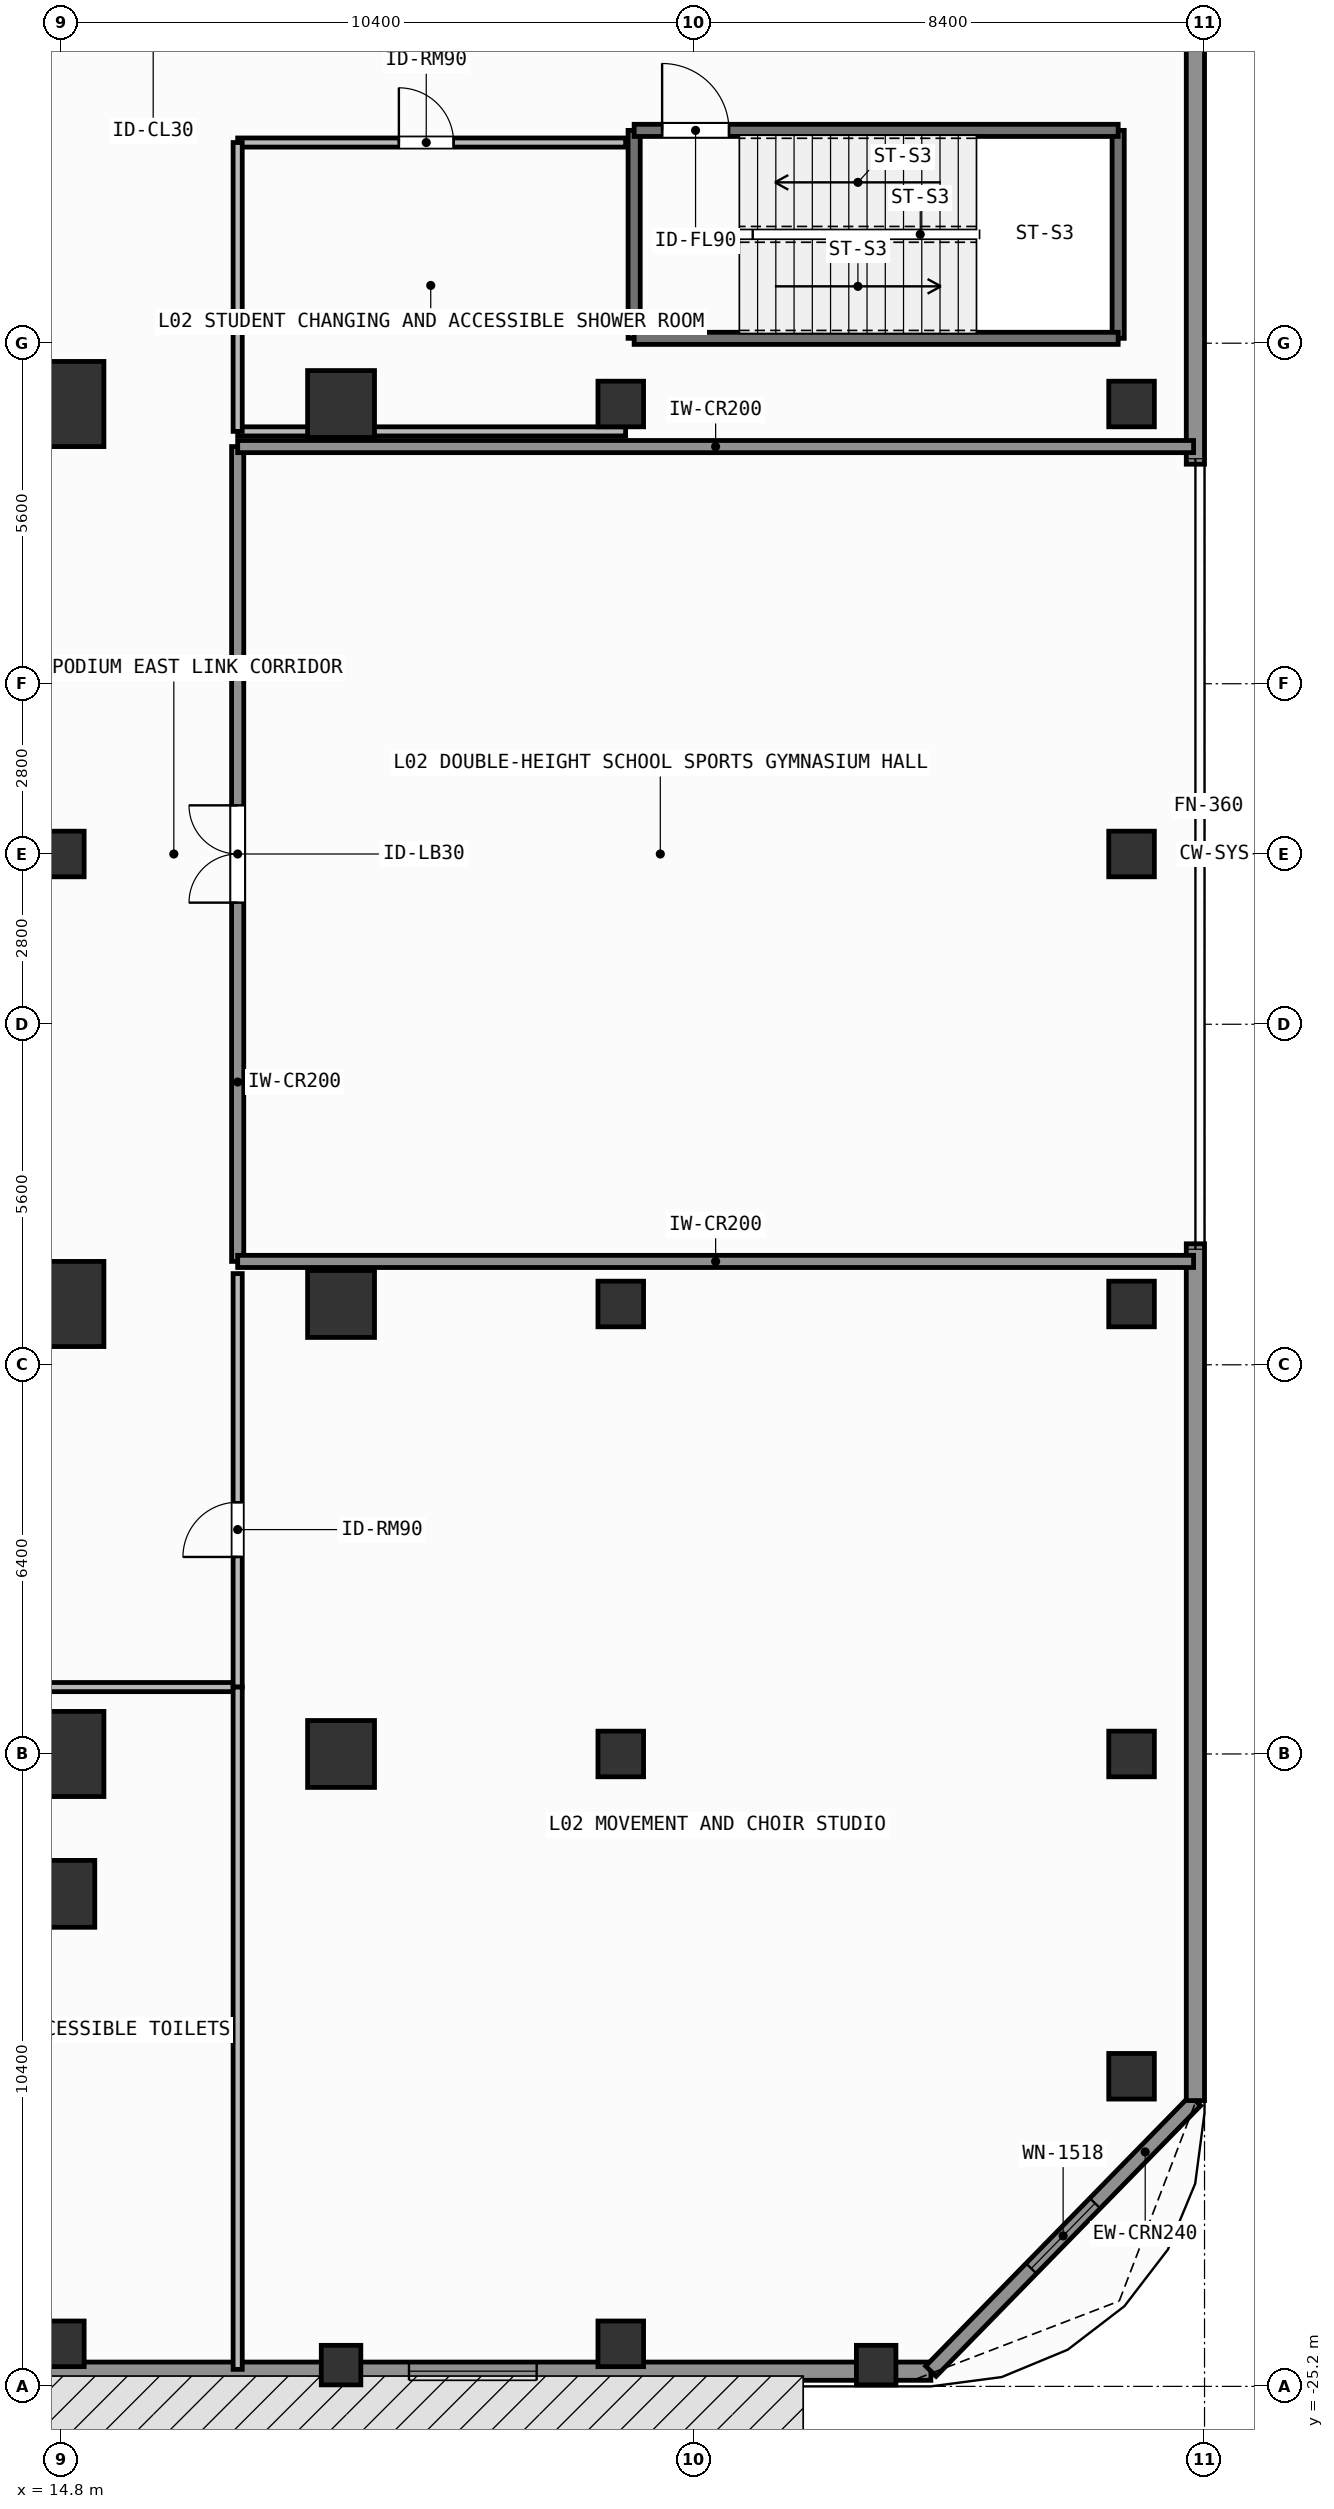
"""IFC4 building model, lengths in metres.
Left out: names, types, materials, properties, quantities, classifications, styles, units other than length and angle.
Written with IfcOpenShell. Run it as: python <this file> out.ifc"""

import sys

from ifc_helpers import new_model, si_unit, direction, frame, frame_2d, origin, origin_2d, place, context, subcontext, project, spatial, rectangle, extrude, element, fill, save


model = new_model("IFC4")
c1 = context("Model", 3, precision=1e-05, world=origin(), true_north=direction((0.0, 1.0)))
c2 = subcontext(c1, "Body", "Model", "MODEL_VIEW")
j1 = project(units=[si_unit("LENGTHUNIT", "METRE"), si_unit("PLANEANGLEUNIT", "RADIAN")], contexts=[c1])
p1 = place(None, origin())
s1 = spatial("IfcSite", under=j1, at=p1, CompositionType="ELEMENT")
p2 = place(p1, origin())
s2 = spatial("IfcBuilding", under=s1, at=p2, CompositionType="ELEMENT")
p3 = place(p2, frame((0.0, 0.0, 4.8)))
s3 = spatial("IfcBuildingStorey", under=s2, at=p3, CompositionType="ELEMENT", Elevation=4.8)
for number, where, z_axis, x_axis in (
    (1, (14.8, -14.8, 0.0), (0.0, 0.0, 1.0), (1.0, 0.0, 0.0)),
    (2, (14.8, -7.4, 0.0), (0.0, 0.0, 1.0), (1.0, 0.0, 0.0)),
    (3, (14.8, 7.4, 0.0), (0.0, 0.0, 1.0), (1.0, 0.0, 0.0)),
):
    element("IfcColumn", number, at=place(p3, frame(where, z_axis=z_axis, x_axis=x_axis)), inside=s3, PredefinedType="COLUMN", context=c2, shape_type="SweptSolid", body=[
        extrude(rectangle(XDim=1.4, YDim=1.4, at=origin_2d()), origin(), (0.0, 0.0, 1.0), 4.2),
    ])
for number, where, z_axis, x_axis in (
    (4, (19.4, -14.8, 0.0), (0.0, 0.0, 1.0), (1.0, 0.0, 0.0)),
    (5, (19.4, -7.4, 0.0), (0.0, 0.0, 1.0), (1.0, 0.0, 0.0)),
    (6, (19.4, 7.4, 0.0), (0.0, 0.0, 1.0), (1.0, 0.0, 0.0)),
    (7, (14.8, -17.1, 0.0), (0.0, 0.0, 1.0), (1.0, 0.0, 0.0)),
):
    element("IfcColumn", number, at=place(p3, frame(where, z_axis=z_axis, x_axis=x_axis)), inside=s3, PredefinedType="COLUMN", context=c2, shape_type="SweptSolid", body=[
        extrude(rectangle(XDim=1.1, YDim=1.1, at=origin_2d()), origin(), (0.0, 0.0, 1.0), 4.2),
    ])
for number, where, z_axis, x_axis in (
    (8, (14.8, -24.5, 0.0), (0.0, 0.0, 1.0), (1.0, 0.0, 0.0)),
    (9, (14.8, 0.0, 0.0), (0.0, 0.0, 1.0), (1.0, 0.0, 0.0)),
    (10, (24.0, -24.5, 0.0), (0.0, 0.0, 1.0), (1.0, 0.0, 0.0)),
    (11, (24.0, -14.8, 0.0), (0.0, 0.0, 1.0), (1.0, 0.0, 0.0)),
    (12, (24.0, -7.4, 0.0), (0.0, 0.0, 1.0), (1.0, 0.0, 0.0)),
    (13, (24.0, 7.4, 0.0), (0.0, 0.0, 1.0), (1.0, 0.0, 0.0)),
    (14, (32.4, -14.8, 0.0), (0.0, 0.0, 1.0), (1.0, 0.0, 0.0)),
    (15, (32.4, -7.4, 0.0), (0.0, 0.0, 1.0), (1.0, 0.0, 0.0)),
    (16, (32.4, 0.0, 0.0), (0.0, 0.0, 1.0), (1.0, 0.0, 0.0)),
    (17, (32.4, 7.4, 0.0), (0.0, 0.0, 1.0), (1.0, 0.0, 0.0)),
    (18, (32.4, -20.1, 0.0), (0.0, 0.0, 1.0), (1.0, 0.0, 0.0)),
):
    element("IfcColumn", number, at=place(p3, frame(where, z_axis=z_axis, x_axis=x_axis)), inside=s3, PredefinedType="COLUMN", context=c2, shape_type="SweptSolid", body=[
        extrude(rectangle(XDim=0.75, YDim=0.75, at=origin_2d()), origin(), (0.0, 0.0, 1.0), 4.2),
    ])
for number, where, z_axis, x_axis in (
    (19, (19.4, -24.85, 0.0), (0.0, 0.0, 1.0), (1.0, 0.0, 0.0)),
    (20, (28.2, -24.85, 0.0), (0.0, 0.0, 1.0), (1.0, 0.0, 0.0)),
):
    element("IfcColumn", number, at=place(p3, frame(where, z_axis=z_axis, x_axis=x_axis)), inside=s3, PredefinedType="PILASTER", context=c2, shape_type="SweptSolid", body=[
        extrude(rectangle(XDim=0.65, YDim=0.65, at=origin_2d()), origin(), (0.0, 0.0, 1.0), 4.2),
    ])
p4 = place(p3, frame((29.1, -24.95, 0.0), z_axis=(0.0, 0.0, 1.0), x_axis=(-1.0, 0.0, 0.0)))
e21 = element("IfcWall", 21, at=p4, inside=s3, PredefinedType="SOLIDWALL", context=c2, shape_type="SweptSolid", body=[
    extrude(rectangle(XDim=58.2, YDim=0.3, at=frame_2d((29.1, 0.0))), origin(), (0.0, 0.0, 1.0), 3.96),
])
p5 = place(p4, frame((39.15, 0.0, 0.85)))
e22 = element("IfcOpeningElement", 22, at=p5, cuts=e21, PredefinedType="OPENING", context=c2, shape_type="SweptSolid", body=[
    extrude(rectangle(XDim=2.1, YDim=2.2, at=frame_2d((1.05, 1.1))), frame((0.0, 0.16, 0.0), z_axis=(0.0, -1.0, 0.0), x_axis=(1.0, 0.0, 0.0)), (0.0, 0.0, 1.0), 0.32),
])
p6 = place(p4, frame((30.875, 0.0, 0.85)))
e23 = element("IfcOpeningElement", 23, at=p6, cuts=e21, PredefinedType="OPENING", context=c2, shape_type="SweptSolid", body=[
    extrude(rectangle(XDim=2.1, YDim=2.2, at=frame_2d((1.05, 1.1))), frame((0.0, 0.16, 0.0), z_axis=(0.0, -1.0, 0.0), x_axis=(1.0, 0.0, 0.0)), (0.0, 0.0, 1.0), 0.32),
])
p7 = place(p4, frame((24.35, 0.0, 0.85)))
e24 = element("IfcOpeningElement", 24, at=p7, cuts=e21, PredefinedType="OPENING", context=c2, shape_type="SweptSolid", body=[
    extrude(rectangle(XDim=2.1, YDim=2.2, at=frame_2d((1.05, 1.1))), frame((0.0, 0.16, 0.0), z_axis=(0.0, -1.0, 0.0), x_axis=(1.0, 0.0, 0.0)), (0.0, 0.0, 1.0), 0.32),
])
p8 = place(p4, frame((18.325, 0.0, 0.85)))
e25 = element("IfcOpeningElement", 25, at=p8, cuts=e21, PredefinedType="OPENING", context=c2, shape_type="SweptSolid", body=[
    extrude(rectangle(XDim=2.1, YDim=2.2, at=frame_2d((1.05, 1.1))), frame((0.0, 0.16, 0.0), z_axis=(0.0, -1.0, 0.0), x_axis=(1.0, 0.0, 0.0)), (0.0, 0.0, 1.0), 0.32),
])
p9 = place(p4, frame((6.483, 0.0, 0.85)))
e26 = element("IfcOpeningElement", 26, at=p9, cuts=e21, PredefinedType="OPENING", context=c2, shape_type="SweptSolid", body=[
    extrude(rectangle(XDim=2.1, YDim=2.2, at=frame_2d((1.05, 1.1))), frame((0.0, 0.16, 0.0), z_axis=(0.0, -1.0, 0.0), x_axis=(1.0, 0.0, 0.0)), (0.0, 0.0, 1.0), 0.32),
])
p10 = place(p3, frame((33.45, -20.5, 0.0), z_axis=(0.0, 0.0, 1.0), x_axis=(-0.69901822973, -0.715103848756, 0.0)))
e27 = element("IfcWall", 27, at=p10, inside=s3, PredefinedType="SOLIDWALL", context=c2, shape_type="SweptSolid", body=[
    extrude(rectangle(XDim=6.223, YDim=0.24, at=frame_2d((3.111, 0.0))), origin(), (0.0, 0.0, 1.0), 3.96),
])
p11 = place(p10, frame((2.362, 0.0, 0.85)))
e28 = element("IfcOpeningElement", 28, at=p11, cuts=e27, PredefinedType="OPENING", context=c2, shape_type="SweptSolid", body=[
    extrude(rectangle(XDim=1.5, YDim=1.85, at=frame_2d((0.75, 0.925))), frame((0.0, 0.13, 0.0), z_axis=(0.0, -1.0, 0.0), x_axis=(1.0, 0.0, 0.0)), (0.0, 0.0, 1.0), 0.26),
])
for number, where, z_axis, x_axis in (
    (29, (33.45, -20.5, 0.0), (0.0, 0.0, 1.0), (0.0, 1.0, 0.0)),
    (30, (33.45, 6.41, 0.0), (0.0, 0.0, 1.0), (0.0, 1.0, 0.0)),
):
    element("IfcWall", number, at=place(p3, frame(where, z_axis=z_axis, x_axis=x_axis)), inside=s3, PredefinedType="SOLIDWALL", context=c2, shape_type="SweptSolid", body=[
        extrude(rectangle(XDim=14.09, YDim=0.3, at=frame_2d((7.045, 0.0))), origin(), (0.0, 0.0, 1.0), 3.96),
    ])
for number, where, z_axis, x_axis in (
    (31, (24.22, 8.48, 0.0), (0.0, 0.0, 1.0), (0.0, 1.0, 0.0)),
    (32, (32.18, 11.9, 0.0), (0.0, 0.0, 1.0), (0.0, -1.0, 0.0)),
):
    element("IfcWall", number, at=place(p3, frame(where, z_axis=z_axis, x_axis=x_axis)), inside=s3, PredefinedType="SHEAR", context=c2, shape_type="SweptSolid", body=[
        extrude(rectangle(XDim=3.42, YDim=0.2, at=frame_2d((1.71, 0.0))), origin(), (0.0, 0.0, 1.0), 3.96),
    ])
p12 = place(p3, frame((32.18, 8.48, 0.0), z_axis=(0.0, 0.0, 1.0), x_axis=(-1.0, 0.0, 0.0)))
e33 = element("IfcWall", 33, at=p12, inside=s3, PredefinedType="SHEAR", context=c2, shape_type="SweptSolid", body=[
    extrude(rectangle(XDim=7.96, YDim=0.2, at=frame_2d((3.98, 0.0))), origin(), (0.0, 0.0, 1.0), 3.96),
])
p13 = place(p3, frame((24.22, 11.9, 0.0), z_axis=(0.0, 0.0, 1.0), x_axis=(1.0, 0.0, 0.0)))
e34 = element("IfcWall", 34, at=p13, inside=s3, PredefinedType="SHEAR", context=c2, shape_type="SweptSolid", body=[
    extrude(rectangle(XDim=7.96, YDim=0.2, at=frame_2d((3.98, 0.0))), origin(), (0.0, 0.0, 1.0), 3.96),
])
p14 = place(p13, frame((0.46, 0.0, 0.0)))
e35 = element("IfcOpeningElement", 35, at=p14, cuts=e34, PredefinedType="OPENING", context=c2, shape_type="SweptSolid", body=[
    extrude(rectangle(XDim=1.1, YDim=2.15, at=frame_2d((0.55, 1.075))), frame((0.0, 0.11, 0.0), z_axis=(0.0, -1.0, 0.0), x_axis=(1.0, 0.0, 0.0)), (0.0, 0.0, 1.0), 0.22),
])
p15 = place(p3, frame((17.7, -6.7, 0.0), z_axis=(0.0, 0.0, 1.0), x_axis=(0.0, 1.0, 0.0)))
e36 = element("IfcWall", 36, at=p15, inside=s3, PredefinedType="SOLIDWALL", context=c2, shape_type="SweptSolid", body=[
    extrude(rectangle(XDim=13.4, YDim=0.2, at=frame_2d((6.7, 0.0))), origin(), (0.0, 0.0, 1.0), 3.96),
])
p16 = place(p15, frame((5.9, 0.0, 0.0)))
e37 = element("IfcOpeningElement", 37, at=p16, cuts=e36, PredefinedType="OPENING", context=c2, shape_type="SweptSolid", body=[
    extrude(rectangle(XDim=1.6, YDim=2.3, at=frame_2d((0.8, 1.15))), frame((0.0, 0.11, 0.0), z_axis=(0.0, -1.0, 0.0), x_axis=(1.0, 0.0, 0.0)), (0.0, 0.0, 1.0), 0.22),
])
p17 = place(p3, frame((17.7, 11.7, 0.0), z_axis=(0.0, 0.0, 1.0), x_axis=(1.0, 0.0, 0.0)))
e38 = element("IfcWall", 38, at=p17, inside=s3, PredefinedType="PARTITIONING", context=c2, shape_type="SweptSolid", body=[
    extrude(rectangle(XDim=6.38, YDim=0.15, at=frame_2d((3.19, 0.0))), origin(), (0.0, 0.0, 1.0), 3.96),
])
p18 = place(p17, frame((2.651, 0.0, 0.0)))
e39 = element("IfcOpeningElement", 39, at=p18, cuts=e38, PredefinedType="OPENING", context=c2, shape_type="SweptSolid", body=[
    extrude(rectangle(XDim=0.9, YDim=2.1, at=frame_2d((0.45, 1.05))), frame((0.0, 0.085, 0.0), z_axis=(0.0, -1.0, 0.0), x_axis=(1.0, 0.0, 0.0)), (0.0, 0.0, 1.0), 0.17),
])
p19 = place(p3, frame((11.6, -13.7, 0.0), z_axis=(0.0, 0.0, 1.0), x_axis=(1.0, 0.0, 0.0)))
e40 = element("IfcWall", 40, at=p19, inside=s3, PredefinedType="PARTITIONING", context=c2, shape_type="SweptSolid", body=[
    extrude(rectangle(XDim=6.05, YDim=0.15, at=frame_2d((3.025, 0.0))), origin(), (0.0, 0.0, 1.0), 3.96),
])
p20 = place(p19, frame((1.412, 0.0, 0.0)))
e41 = element("IfcOpeningElement", 41, at=p20, cuts=e40, PredefinedType="OPENING", context=c2, shape_type="SweptSolid", body=[
    extrude(rectangle(XDim=0.9, YDim=2.1, at=frame_2d((0.45, 1.05))), frame((0.0, 0.085, 0.0), z_axis=(0.0, -1.0, 0.0), x_axis=(1.0, 0.0, 0.0)), (0.0, 0.0, 1.0), 0.17),
])
p21 = place(p3, frame((17.7, -13.7, 0.0), z_axis=(0.0, 0.0, 1.0), x_axis=(0.0, 1.0, 0.0)))
e42 = element("IfcWall", 42, at=p21, inside=s3, PredefinedType="PARTITIONING", context=c2, shape_type="SweptSolid", body=[
    extrude(rectangle(XDim=6.8, YDim=0.15, at=frame_2d((3.4, 0.0))), origin(), (0.0, 0.0, 1.0), 3.96),
])
p22 = place(p21, frame((2.14, 0.0, 0.0)))
e43 = element("IfcOpeningElement", 43, at=p22, cuts=e42, PredefinedType="OPENING", context=c2, shape_type="SweptSolid", body=[
    extrude(rectangle(XDim=0.9, YDim=2.1, at=frame_2d((0.45, 1.05))), frame((0.0, 0.085, 0.0), z_axis=(0.0, -1.0, 0.0), x_axis=(1.0, 0.0, 0.0)), (0.0, 0.0, 1.0), 0.17),
])
for number, where, z_axis, x_axis in (
    (44, (17.7, -6.7, 0.0), (0.0, 0.0, 1.0), (1.0, 0.0, 0.0)),
    (45, (17.7, 6.7, 0.0), (0.0, 0.0, 1.0), (1.0, 0.0, 0.0)),
):
    element("IfcWall", number, at=place(p3, frame(where, z_axis=z_axis, x_axis=x_axis)), inside=s3, PredefinedType="SOLIDWALL", context=c2, shape_type="SweptSolid", body=[
        extrude(rectangle(XDim=15.72, YDim=0.2, at=frame_2d((7.86, 0.0))), origin(), (0.0, 0.0, 1.0), 3.96),
    ])
p23 = place(p3, frame((17.7, 6.95, 0.0), z_axis=(0.0, 0.0, 1.0), x_axis=(1.0, 0.0, 0.0)))
e46 = element("IfcWall", 46, at=p23, inside=s3, PredefinedType="PARTITIONING", context=c2, shape_type="SweptSolid", body=[
    extrude(rectangle(XDim=6.38, YDim=0.15, at=frame_2d((3.19, 0.0))), origin(), (0.0, 0.0, 1.0), 3.96),
])
p24 = place(p3, frame((17.7, 6.95, 0.0), z_axis=(0.0, 0.0, 1.0), x_axis=(0.0, 1.0, 0.0)))
e47 = element("IfcWall", 47, at=p24, inside=s3, PredefinedType="PARTITIONING", context=c2, shape_type="SweptSolid", body=[
    extrude(rectangle(XDim=4.75, YDim=0.15, at=frame_2d((2.375, 0.0))), origin(), (0.0, 0.0, 1.0), 3.96),
])
p25 = place(p3, frame((17.7, -13.7, 0.0), z_axis=(0.0, 0.0, 1.0), x_axis=(0.0, -1.0, 0.0)))
e48 = element("IfcWall", 48, at=p25, inside=s3, PredefinedType="PARTITIONING", context=c2, shape_type="SweptSolid", body=[
    extrude(rectangle(XDim=11.22, YDim=0.15, at=frame_2d((5.61, 0.0))), origin(), (0.0, 0.0, 1.0), 3.96),
])
p26 = place(p11, origin())
e49 = element("IfcWindow", 49, at=p26, inside=s3, PartitioningType="SINGLE_PANEL", PredefinedType="WINDOW", context=c2, shape_type="SweptSolid", body=[
    extrude(rectangle(XDim=1.5, YDim=1.85, at=frame_2d((0.75, 0.925))), frame((0.0, 0.03, 0.0), z_axis=(0.0, -1.0, 0.0), x_axis=(1.0, 0.0, 0.0)), (0.0, 0.0, 1.0), 0.06),
])
fill(e28, e49)
p27 = place(p9, origin())
e50 = element("IfcWindow", 50, at=p27, inside=s3, PartitioningType="SINGLE_PANEL", PredefinedType="WINDOW", context=c2, shape_type="SweptSolid", body=[
    extrude(rectangle(XDim=2.1, YDim=2.2, at=frame_2d((1.05, 1.1))), frame((0.0, 0.03, 0.0), z_axis=(0.0, -1.0, 0.0), x_axis=(1.0, 0.0, 0.0)), (0.0, 0.0, 1.0), 0.06),
])
fill(e26, e50)
p28 = place(p14, origin())
e51 = element("IfcDoor", 51, at=p28, inside=s3, OperationType="SINGLE_SWING_LEFT", PredefinedType="DOOR", context=c2, shape_type="SweptSolid", body=[
    extrude(rectangle(XDim=1.1, YDim=2.15, at=frame_2d((0.55, 1.075))), frame((0.0, 0.025, 0.0), z_axis=(0.0, -1.0, 0.0), x_axis=(1.0, 0.0, 0.0)), (0.0, 0.0, 1.0), 0.05),
])
fill(e35, e51)
p29 = place(p16, origin())
e52 = element("IfcDoor", 52, at=p29, inside=s3, OperationType="SINGLE_SWING_LEFT", PredefinedType="DOOR", context=c2, shape_type="SweptSolid", body=[
    extrude(rectangle(XDim=1.6, YDim=2.3, at=frame_2d((0.8, 1.15))), frame((0.0, 0.025, 0.0), z_axis=(0.0, -1.0, 0.0), x_axis=(1.0, 0.0, 0.0)), (0.0, 0.0, 1.0), 0.05),
])
fill(e37, e52)
p30 = place(p18, origin())
e53 = element("IfcDoor", 53, at=p30, inside=s3, OperationType="SINGLE_SWING_LEFT", PredefinedType="DOOR", context=c2, shape_type="SweptSolid", body=[
    extrude(rectangle(XDim=0.9, YDim=2.1, at=frame_2d((0.45, 1.05))), frame((0.0, 0.025, 0.0), z_axis=(0.0, -1.0, 0.0), x_axis=(1.0, 0.0, 0.0)), (0.0, 0.0, 1.0), 0.05),
])
fill(e39, e53)
p31 = place(p22, origin())
e54 = element("IfcDoor", 54, at=p31, inside=s3, OperationType="SINGLE_SWING_LEFT", PredefinedType="DOOR", context=c2, shape_type="SweptSolid", body=[
    extrude(rectangle(XDim=0.9, YDim=2.1, at=frame_2d((0.45, 1.05))), frame((0.0, 0.025, 0.0), z_axis=(0.0, -1.0, 0.0), x_axis=(1.0, 0.0, 0.0)), (0.0, 0.0, 1.0), 0.05),
])
fill(e43, e54)
save(model, sys.argv[1])
